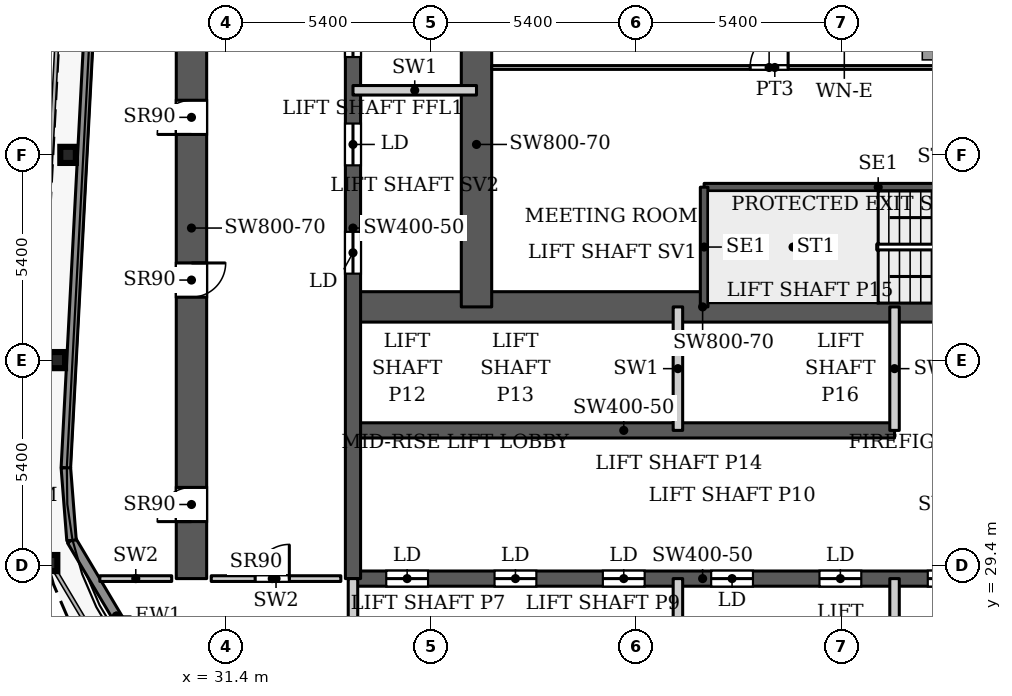
"""IFC4 building model, lengths in metres.
Left out: names, types, materials, properties, quantities, classifications, styles, units other than length and angle.
Written with IfcOpenShell. Run it as: python <this file> out.ifc"""

import sys

from ifc_helpers import new_model, si_unit, direction, frame, frame_2d, origin, origin_2d, place, context, subcontext, project, spatial, rectangle, i_section, extrude, source, transform, mapped, element, fill, save


model = new_model("IFC4")
c1 = context("Model", 3, precision=1e-05, world=origin(), true_north=direction((0.0, 1.0)))
c2 = subcontext(c1, "Body", "Model", "MODEL_VIEW")
j1 = project(units=[si_unit("LENGTHUNIT", "METRE"), si_unit("PLANEANGLEUNIT", "RADIAN")], contexts=[c1])
p1 = place(None, origin())
s1 = spatial("IfcSite", under=j1, at=p1, CompositionType="ELEMENT")
p2 = place(p1, origin())
s2 = spatial("IfcBuilding", under=s1, at=p2, CompositionType="ELEMENT")
p3 = place(p2, frame((0.0, 0.0, 168.2)))
s3 = spatial("IfcBuildingStorey", under=s2, at=p3, CompositionType="ELEMENT", Elevation=168.2)
for number, where, z_axis, x_axis in (
    (1, (26.766, 29.459, 0.0), (0.0, 0.0, 1.0), (1.0, 0.0, 0.0)),
    (2, (26.969, 34.8, 0.0), (0.0, 0.0, 1.0), (1.0, 0.0, 0.0)),
    (3, (27.253, 40.2, 0.0), (0.0, 0.0, 1.0), (1.0, 0.0, 0.0)),
):
    element("IfcColumn", number, at=place(p3, frame(where, z_axis=z_axis, x_axis=x_axis)), inside=s3, PredefinedType="COLUMN", context=c2, shape_type="SweptSolid", body=[
        extrude(i_section(OverallWidth=0.409, OverallDepth=0.425, WebThickness=0.033, FlangeThickness=0.052, FilletRadius=0.013, at=origin_2d()), origin(), (0.0, 0.0, 1.0), 3.9),
    ])
p4 = place(p3, frame((34.75, 29.05, 0.0), z_axis=(0.0, 0.0, 1.0), x_axis=(1.0, 0.0, 0.0)))
e4 = element("IfcWall", 4, at=p4, inside=s3, PredefinedType="SHEAR", context=c2, shape_type="SweptSolid", body=[
    extrude(rectangle(XDim=18.4, YDim=0.4, at=frame_2d((9.2, 0.0))), origin(), (0.0, 0.0, 1.0), 3.9),
])
p5 = place(p4, frame((0.875, 0.0, 0.0)))
e5 = element("IfcOpeningElement", 5, at=p5, cuts=e4, PredefinedType="OPENING", context=c2, shape_type="SweptSolid", body=[
    extrude(rectangle(XDim=1.1, YDim=2.2, at=frame_2d((0.55, 1.1))), frame((0.0, 0.21, 0.0), z_axis=(0.0, -1.0, 0.0), x_axis=(1.0, 0.0, 0.0)), (0.0, 0.0, 1.0), 0.42),
])
p6 = place(p4, frame((3.725, 0.0, 0.0)))
e6 = element("IfcOpeningElement", 6, at=p6, cuts=e4, PredefinedType="OPENING", context=c2, shape_type="SweptSolid", body=[
    extrude(rectangle(XDim=1.1, YDim=2.2, at=frame_2d((0.55, 1.1))), frame((0.0, 0.21, 0.0), z_axis=(0.0, -1.0, 0.0), x_axis=(1.0, 0.0, 0.0)), (0.0, 0.0, 1.0), 0.42),
])
p7 = place(p4, frame((6.575, 0.0, 0.0)))
e7 = element("IfcOpeningElement", 7, at=p7, cuts=e4, PredefinedType="OPENING", context=c2, shape_type="SweptSolid", body=[
    extrude(rectangle(XDim=1.1, YDim=2.2, at=frame_2d((0.55, 1.1))), frame((0.0, 0.21, 0.0), z_axis=(0.0, -1.0, 0.0), x_axis=(1.0, 0.0, 0.0)), (0.0, 0.0, 1.0), 0.42),
])
p8 = place(p4, frame((9.425, 0.0, 0.0)))
e8 = element("IfcOpeningElement", 8, at=p8, cuts=e4, PredefinedType="OPENING", context=c2, shape_type="SweptSolid", body=[
    extrude(rectangle(XDim=1.1, YDim=2.2, at=frame_2d((0.55, 1.1))), frame((0.0, 0.21, 0.0), z_axis=(0.0, -1.0, 0.0), x_axis=(1.0, 0.0, 0.0)), (0.0, 0.0, 1.0), 0.42),
])
p9 = place(p4, frame((12.275, 0.0, 0.0)))
e9 = element("IfcOpeningElement", 9, at=p9, cuts=e4, PredefinedType="OPENING", context=c2, shape_type="SweptSolid", body=[
    extrude(rectangle(XDim=1.1, YDim=2.2, at=frame_2d((0.55, 1.1))), frame((0.0, 0.21, 0.0), z_axis=(0.0, -1.0, 0.0), x_axis=(1.0, 0.0, 0.0)), (0.0, 0.0, 1.0), 0.42),
])
p10 = place(p4, frame((15.125, 0.0, 0.0)))
e10 = element("IfcOpeningElement", 10, at=p10, cuts=e4, PredefinedType="OPENING", context=c2, shape_type="SweptSolid", body=[
    extrude(rectangle(XDim=1.1, YDim=2.2, at=frame_2d((0.55, 1.1))), frame((0.0, 0.21, 0.0), z_axis=(0.0, -1.0, 0.0), x_axis=(1.0, 0.0, 0.0)), (0.0, 0.0, 1.0), 0.42),
])
p11 = place(p3, frame((34.75, 32.95, 0.0), z_axis=(0.0, 0.0, 1.0), x_axis=(1.0, 0.0, 0.0)))
e11 = element("IfcWall", 11, at=p11, inside=s3, PredefinedType="SHEAR", context=c2, shape_type="SweptSolid", body=[
    extrude(rectangle(XDim=14.25, YDim=0.4, at=frame_2d((7.125, 0.0))), origin(), (0.0, 0.0, 1.0), 3.9),
])
p12 = place(p3, frame((34.75, 36.2, 0.0), z_axis=(0.0, 0.0, 1.0), x_axis=(1.0, 0.0, 0.0)))
e12 = element("IfcWall", 12, at=p12, inside=s3, PredefinedType="SHEAR", context=c2, shape_type="SweptSolid", body=[
    extrude(rectangle(XDim=18.4, YDim=0.8, at=frame_2d((9.2, 0.0))), origin(), (0.0, 0.0, 1.0), 3.9),
])
p13 = place(p12, frame((16.9, 0.0, 0.0)))
e13 = element("IfcOpeningElement", 13, at=p13, cuts=e12, PredefinedType="OPENING", context=c2, shape_type="SweptSolid", body=[
    extrude(rectangle(XDim=1.0, YDim=2.2, at=frame_2d((0.5, 1.1))), frame((0.0, 0.41, 0.0), z_axis=(0.0, -1.0, 0.0), x_axis=(1.0, 0.0, 0.0)), (0.0, 0.0, 1.0), 0.82),
])
p14 = place(p3, frame((34.75, 29.05, 0.0), z_axis=(0.0, 0.0, 1.0), x_axis=(0.0, 1.0, 0.0)))
e14 = element("IfcWall", 14, at=p14, inside=s3, PredefinedType="SHEAR", context=c2, shape_type="SweptSolid", body=[
    extrude(rectangle(XDim=18.45, YDim=0.4, at=frame_2d((9.225, 0.0))), origin(), (0.0, 0.0, 1.0), 3.9),
])
p15 = place(p14, frame((8.025, 0.0, 0.0)))
e15 = element("IfcOpeningElement", 15, at=p15, cuts=e14, PredefinedType="OPENING", context=c2, shape_type="SweptSolid", body=[
    extrude(rectangle(XDim=1.1, YDim=2.2, at=frame_2d((0.55, 1.1))), frame((0.0, 0.21, 0.0), z_axis=(0.0, -1.0, 0.0), x_axis=(1.0, 0.0, 0.0)), (0.0, 0.0, 1.0), 0.42),
])
p16 = place(p14, frame((10.875, 0.0, 0.0)))
e16 = element("IfcOpeningElement", 16, at=p16, cuts=e14, PredefinedType="OPENING", context=c2, shape_type="SweptSolid", body=[
    extrude(rectangle(XDim=1.1, YDim=2.2, at=frame_2d((0.55, 1.1))), frame((0.0, 0.21, 0.0), z_axis=(0.0, -1.0, 0.0), x_axis=(1.0, 0.0, 0.0)), (0.0, 0.0, 1.0), 0.42),
])
p17 = place(p14, frame((13.725, 0.0, 0.0)))
e17 = element("IfcOpeningElement", 17, at=p17, cuts=e14, PredefinedType="OPENING", context=c2, shape_type="SweptSolid", body=[
    extrude(rectangle(XDim=1.1, YDim=2.2, at=frame_2d((0.55, 1.1))), frame((0.0, 0.21, 0.0), z_axis=(0.0, -1.0, 0.0), x_axis=(1.0, 0.0, 0.0)), (0.0, 0.0, 1.0), 0.42),
])
p18 = place(p14, frame((15.95, 0.0, 0.0)))
e18 = element("IfcOpeningElement", 18, at=p18, cuts=e14, PredefinedType="OPENING", context=c2, shape_type="SweptSolid", body=[
    extrude(rectangle(XDim=1.1, YDim=2.2, at=frame_2d((0.55, 1.1))), frame((0.0, 0.21, 0.0), z_axis=(0.0, -1.0, 0.0), x_axis=(1.0, 0.0, 0.0)), (0.0, 0.0, 1.0), 0.42),
])
p19 = place(p3, frame((38.0, 36.2, 0.0), z_axis=(0.0, 0.0, 1.0), x_axis=(0.0, 1.0, 0.0)))
e19 = element("IfcWall", 19, at=p19, inside=s3, PredefinedType="SHEAR", context=c2, shape_type="SweptSolid", body=[
    extrude(rectangle(XDim=8.55, YDim=0.8, at=frame_2d((4.275, 0.0))), origin(), (0.0, 0.0, 1.0), 3.9),
])
p20 = place(p3, frame((30.5, 29.05, 0.0), z_axis=(0.0, 0.0, 1.0), x_axis=(0.0, 1.0, 0.0)))
e20 = element("IfcWall", 20, at=p20, inside=s3, PredefinedType="SHEAR", context=c2, shape_type="SweptSolid", body=[
    extrude(rectangle(XDim=18.45, YDim=0.8, at=frame_2d((9.225, 0.0))), origin(), (0.0, 0.0, 1.0), 3.9),
])
p21 = place(p20, frame((1.5, 0.0, 0.0)))
e21 = element("IfcOpeningElement", 21, at=p21, cuts=e20, PredefinedType="OPENING", context=c2, shape_type="SweptSolid", body=[
    extrude(rectangle(XDim=0.9, YDim=2.2, at=frame_2d((0.45, 1.1))), frame((0.0, 0.41, 0.0), z_axis=(0.0, -1.0, 0.0), x_axis=(1.0, 0.0, 0.0)), (0.0, 0.0, 1.0), 0.82),
])
p22 = place(p20, frame((7.406, 0.0, 0.0)))
e22 = element("IfcOpeningElement", 22, at=p22, cuts=e20, PredefinedType="OPENING", context=c2, shape_type="SweptSolid", body=[
    extrude(rectangle(XDim=0.9, YDim=2.2, at=frame_2d((0.45, 1.1))), frame((0.0, 0.41, 0.0), z_axis=(0.0, -1.0, 0.0), x_axis=(1.0, 0.0, 0.0)), (0.0, 0.0, 1.0), 0.82),
])
p23 = place(p20, frame((11.688, 0.0, 0.0)))
e23 = element("IfcOpeningElement", 23, at=p23, cuts=e20, PredefinedType="OPENING", context=c2, shape_type="SweptSolid", body=[
    extrude(rectangle(XDim=0.9, YDim=2.2, at=frame_2d((0.45, 1.1))), frame((0.0, 0.41, 0.0), z_axis=(0.0, -1.0, 0.0), x_axis=(1.0, 0.0, 0.0)), (0.0, 0.0, 1.0), 0.82),
])
p24 = place(p3, frame((29.712, 26.072, 0.0), z_axis=(0.0, 0.0, 1.0), x_axis=(-0.511028049012, 0.859564036662, 0.0)))
e24 = element("IfcWall", 24, at=p24, inside=s3, PredefinedType="SOLIDWALL", context=c2, shape_type="SweptSolid", body=[
    extrude(rectangle(XDim=4.634, YDim=0.25, at=frame_2d((2.317, 0.0))), origin(), (0.0, 0.0, 1.0), 3.147),
])
p25 = place(p3, frame((27.344, 30.055, 0.0), z_axis=(0.0, 0.0, 1.0), x_axis=(-0.077571675317, 0.99698677784, 0.0)))
e25 = element("IfcWall", 25, at=p25, inside=s3, PredefinedType="SOLIDWALL", context=c2, shape_type="SweptSolid", body=[
    extrude(rectangle(XDim=1.92, YDim=0.25, at=frame_2d((0.96, 0.0))), origin(), (0.0, 0.0, 1.0), 3.75),
])
p26 = place(p3, frame((27.195, 31.969, 0.0), z_axis=(0.0, 0.0, 1.0), x_axis=(0.052554995867, 0.998618031286, 0.0)))
e26 = element("IfcWall", 26, at=p26, inside=s3, PredefinedType="SOLIDWALL", context=c2, shape_type="SweptSolid", body=[
    extrude(rectangle(XDim=66.787, YDim=0.25, at=frame_2d((33.394, 0.0))), origin(), (0.0, 0.0, 1.0), 3.75),
])
p27 = place(p3, frame((43.99, 39.35, 0.0), z_axis=(0.0, 0.0, 1.0), x_axis=(1.0, 0.0, 0.0)))
e27 = element("IfcWall", 27, at=p27, inside=s3, PredefinedType="SHEAR", context=c2, shape_type="SweptSolid", body=[
    extrude(rectangle(XDim=9.16, YDim=0.2, at=frame_2d((4.58, 0.0))), origin(), (0.0, 0.0, 1.0), 3.9),
])
p28 = place(p3, frame((43.99, 36.2, 0.0), z_axis=(0.0, 0.0, 1.0), x_axis=(0.0, 1.0, 0.0)))
e28 = element("IfcWall", 28, at=p28, inside=s3, PredefinedType="SHEAR", context=c2, shape_type="SweptSolid", body=[
    extrude(rectangle(XDim=3.15, YDim=0.2, at=frame_2d((1.575, 0.0))), origin(), (0.0, 0.0, 1.0), 3.9),
])
for number, where, z_axis, x_axis in (
    (29, (34.75, 25.8, 0.0), (0.0, 0.0, 1.0), (0.0, 1.0, 0.0)),
    (30, (43.3, 25.8, 0.0), (0.0, 0.0, 1.0), (0.0, 1.0, 0.0)),
    (31, (43.3, 32.95, 0.0), (0.0, 0.0, 1.0), (0.0, 1.0, 0.0)),
    (32, (49.0, 25.8, 0.0), (0.0, 0.0, 1.0), (0.0, 1.0, 0.0)),
    (33, (49.0, 32.95, 0.0), (0.0, 0.0, 1.0), (0.0, 1.0, 0.0)),
    (34, (34.75, 41.9, 0.0), (0.0, 0.0, 1.0), (1.0, 0.0, 0.0)),
):
    element("IfcWall", number, at=place(p3, frame(where, z_axis=z_axis, x_axis=x_axis)), inside=s3, PredefinedType="PARTITIONING", context=c2, shape_type="SweptSolid", body=[
        extrude(rectangle(XDim=3.25, YDim=0.25, at=frame_2d((1.625, 0.0))), origin(), (0.0, 0.0, 1.0), 3.9),
    ])
p29 = place(p3, frame((28.089, 29.05, 0.0), z_axis=(0.0, 0.0, 1.0), x_axis=(1.0, 0.0, 0.0)))
e35 = element("IfcWall", 35, at=p29, inside=s3, PredefinedType="PARTITIONING", context=c2, shape_type="SweptSolid", body=[
    extrude(rectangle(XDim=1.891, YDim=0.15, at=frame_2d((0.945, 0.0))), origin(), (0.0, 0.0, 1.0), 3.9),
])
p30 = place(p3, frame((31.02, 29.05, 0.0), z_axis=(0.0, 0.0, 1.0), x_axis=(1.0, 0.0, 0.0)))
e36 = element("IfcWall", 36, at=p30, inside=s3, PredefinedType="PARTITIONING", context=c2, shape_type="SweptSolid", body=[
    extrude(rectangle(XDim=3.41, YDim=0.15, at=frame_2d((1.705, 0.0))), origin(), (0.0, 0.0, 1.0), 3.9),
])
p31 = place(p30, frame((1.155, 0.0, 0.0)))
e37 = element("IfcOpeningElement", 37, at=p31, cuts=e36, PredefinedType="OPENING", context=c2, shape_type="SweptSolid", body=[
    extrude(rectangle(XDim=0.9, YDim=2.2, at=frame_2d((0.45, 1.1))), frame((0.0, 0.085, 0.0), z_axis=(0.0, -1.0, 0.0), x_axis=(1.0, 0.0, 0.0)), (0.0, 0.0, 1.0), 0.17),
])
p32 = place(p3, frame((38.399, 42.5, 0.0), z_axis=(0.0, 0.0, 1.0), x_axis=(1.0, 0.0, 0.0)))
e38 = element("IfcWall", 38, at=p32, inside=s3, PredefinedType="PARTITIONING", context=c2, shape_type="SweptSolid", body=[
    extrude(rectangle(XDim=14.901, YDim=0.1, at=frame_2d((7.451, 0.0))), origin(), (0.0, 0.0, 1.0), 3.6),
])
p33 = place(p32, frame((6.801, 0.0, 0.0)))
e39 = element("IfcOpeningElement", 39, at=p33, cuts=e38, PredefinedType="OPENING", context=c2, shape_type="SweptSolid", body=[
    extrude(rectangle(XDim=1.0, YDim=2.1, at=frame_2d((0.5, 1.05))), frame((0.0, 0.06, 0.0), z_axis=(0.0, -1.0, 0.0), x_axis=(1.0, 0.0, 0.0)), (0.0, 0.0, 1.0), 0.12),
])
m1 = source(origin(), c2, "Body", "SweptSolid", [
    extrude(rectangle(XDim=1.1, YDim=2.2, at=frame_2d((0.55, 1.1))), frame((0.0, 0.025, 0.0), z_axis=(0.0, -1.0, 0.0), x_axis=(1.0, 0.0, 0.0)), (0.0, 0.0, 1.0), 0.05),
])
p34 = place(p5, origin())
e40 = element("IfcDoor", 40, at=p34, inside=s3, OperationType="SLIDING_TO_LEFT", PredefinedType="DOOR", context=c2, shape_type="MappedRepresentation", body=[
    mapped(m1, transform((0.0, 0.0, 0.0), x_axis=(1.0, 0.0, 0.0), y_axis=(0.0, 1.0, 0.0), z_axis=(0.0, 0.0, 1.0), scale=1.0)),
])
fill(e5, e40)
p35 = place(p6, origin())
e41 = element("IfcDoor", 41, at=p35, inside=s3, OperationType="SLIDING_TO_LEFT", PredefinedType="DOOR", context=c2, shape_type="MappedRepresentation", body=[
    mapped(m1, transform((0.0, 0.0, 0.0), x_axis=(1.0, 0.0, 0.0), y_axis=(0.0, 1.0, 0.0), z_axis=(0.0, 0.0, 1.0), scale=1.0)),
])
fill(e6, e41)
p36 = place(p7, origin())
e42 = element("IfcDoor", 42, at=p36, inside=s3, OperationType="SLIDING_TO_LEFT", PredefinedType="DOOR", context=c2, shape_type="MappedRepresentation", body=[
    mapped(m1, transform((0.0, 0.0, 0.0), x_axis=(1.0, 0.0, 0.0), y_axis=(0.0, 1.0, 0.0), z_axis=(0.0, 0.0, 1.0), scale=1.0)),
])
fill(e7, e42)
p37 = place(p8, origin())
e43 = element("IfcDoor", 43, at=p37, inside=s3, OperationType="SLIDING_TO_LEFT", PredefinedType="DOOR", context=c2, shape_type="MappedRepresentation", body=[
    mapped(m1, transform((0.0, 0.0, 0.0), x_axis=(1.0, 0.0, 0.0), y_axis=(0.0, 1.0, 0.0), z_axis=(0.0, 0.0, 1.0), scale=1.0)),
])
fill(e8, e43)
p38 = place(p9, origin())
e44 = element("IfcDoor", 44, at=p38, inside=s3, OperationType="SLIDING_TO_LEFT", PredefinedType="DOOR", context=c2, shape_type="MappedRepresentation", body=[
    mapped(m1, transform((0.0, 0.0, 0.0), x_axis=(1.0, 0.0, 0.0), y_axis=(0.0, 1.0, 0.0), z_axis=(0.0, 0.0, 1.0), scale=1.0)),
])
fill(e9, e44)
p39 = place(p15, origin())
e45 = element("IfcDoor", 45, at=p39, inside=s3, OperationType="SLIDING_TO_LEFT", PredefinedType="DOOR", context=c2, shape_type="MappedRepresentation", body=[
    mapped(m1, transform((0.0, 0.0, 0.0), x_axis=(1.0, 0.0, 0.0), y_axis=(0.0, 1.0, 0.0), z_axis=(0.0, 0.0, 1.0), scale=1.0)),
])
fill(e15, e45)
p40 = place(p16, origin())
e46 = element("IfcDoor", 46, at=p40, inside=s3, OperationType="SLIDING_TO_LEFT", PredefinedType="DOOR", context=c2, shape_type="MappedRepresentation", body=[
    mapped(m1, transform((0.0, 0.0, 0.0), x_axis=(1.0, 0.0, 0.0), y_axis=(0.0, 1.0, 0.0), z_axis=(0.0, 0.0, 1.0), scale=1.0)),
])
fill(e16, e46)
p41 = place(p17, origin())
e47 = element("IfcDoor", 47, at=p41, inside=s3, OperationType="SLIDING_TO_LEFT", PredefinedType="DOOR", context=c2, shape_type="MappedRepresentation", body=[
    mapped(m1, transform((0.0, 0.0, 0.0), x_axis=(1.0, 0.0, 0.0), y_axis=(0.0, 1.0, 0.0), z_axis=(0.0, 0.0, 1.0), scale=1.0)),
])
fill(e17, e47)
p42 = place(p10, origin())
e48 = element("IfcDoor", 48, at=p42, inside=s3, OperationType="SLIDING_TO_LEFT", PredefinedType="DOOR", context=c2, shape_type="MappedRepresentation", body=[
    mapped(m1, transform((0.0, 0.0, 0.0), x_axis=(1.0, 0.0, 0.0), y_axis=(0.0, 1.0, 0.0), z_axis=(0.0, 0.0, 1.0), scale=1.0)),
])
fill(e10, e48)
m2 = source(origin(), c2, "Body", "SweptSolid", [
    extrude(rectangle(XDim=0.9, YDim=2.2, at=frame_2d((0.45, 1.1))), frame((0.0, 0.025, 0.0), z_axis=(0.0, -1.0, 0.0), x_axis=(1.0, 0.0, 0.0)), (0.0, 0.0, 1.0), 0.05),
])
p43 = place(p21, origin())
e49 = element("IfcDoor", 49, at=p43, inside=s3, OperationType="SINGLE_SWING_LEFT", PredefinedType="DOOR", context=c2, shape_type="MappedRepresentation", body=[
    mapped(m2, transform((0.0, 0.0, 0.0), x_axis=(1.0, 0.0, 0.0), y_axis=(0.0, 1.0, 0.0), z_axis=(0.0, 0.0, 1.0), scale=1.0)),
])
fill(e21, e49)
p44 = place(p22, origin())
e50 = element("IfcDoor", 50, at=p44, inside=s3, OperationType="SINGLE_SWING_RIGHT", PredefinedType="DOOR", context=c2, shape_type="MappedRepresentation", body=[
    mapped(m2, transform((0.0, 0.0, 0.0), x_axis=(1.0, 0.0, 0.0), y_axis=(0.0, 1.0, 0.0), z_axis=(0.0, 0.0, 1.0), scale=1.0)),
])
fill(e22, e50)
p45 = place(p23, origin())
e51 = element("IfcDoor", 51, at=p45, inside=s3, OperationType="SINGLE_SWING_LEFT", PredefinedType="DOOR", context=c2, shape_type="MappedRepresentation", body=[
    mapped(m2, transform((0.0, 0.0, 0.0), x_axis=(1.0, 0.0, 0.0), y_axis=(0.0, 1.0, 0.0), z_axis=(0.0, 0.0, 1.0), scale=1.0)),
])
fill(e23, e51)
p46 = place(p31, origin())
e52 = element("IfcDoor", 52, at=p46, inside=s3, OperationType="SINGLE_SWING_LEFT", PredefinedType="DOOR", context=c2, shape_type="MappedRepresentation", body=[
    mapped(m2, transform((0.0, 0.0, 0.0), x_axis=(1.0, 0.0, 0.0), y_axis=(0.0, 1.0, 0.0), z_axis=(0.0, 0.0, 1.0), scale=1.0)),
])
fill(e37, e52)
m3 = source(origin(), c2, "Body", "SweptSolid", [
    extrude(rectangle(XDim=1.0, YDim=2.1, at=frame_2d((0.5, 1.05))), frame((0.0, 0.025, 0.0), z_axis=(0.0, -1.0, 0.0), x_axis=(1.0, 0.0, 0.0)), (0.0, 0.0, 1.0), 0.05),
])
p47 = place(p33, origin())
e53 = element("IfcDoor", 53, at=p47, inside=s3, OperationType="SINGLE_SWING_LEFT", PredefinedType="DOOR", context=c2, shape_type="MappedRepresentation", body=[
    mapped(m3, transform((0.0, 0.0, 0.0), x_axis=(1.0, 0.0, 0.0), y_axis=(0.0, 1.0, 0.0), z_axis=(0.0, 0.0, 1.0), scale=1.0)),
])
fill(e39, e53)
save(model, sys.argv[1])
